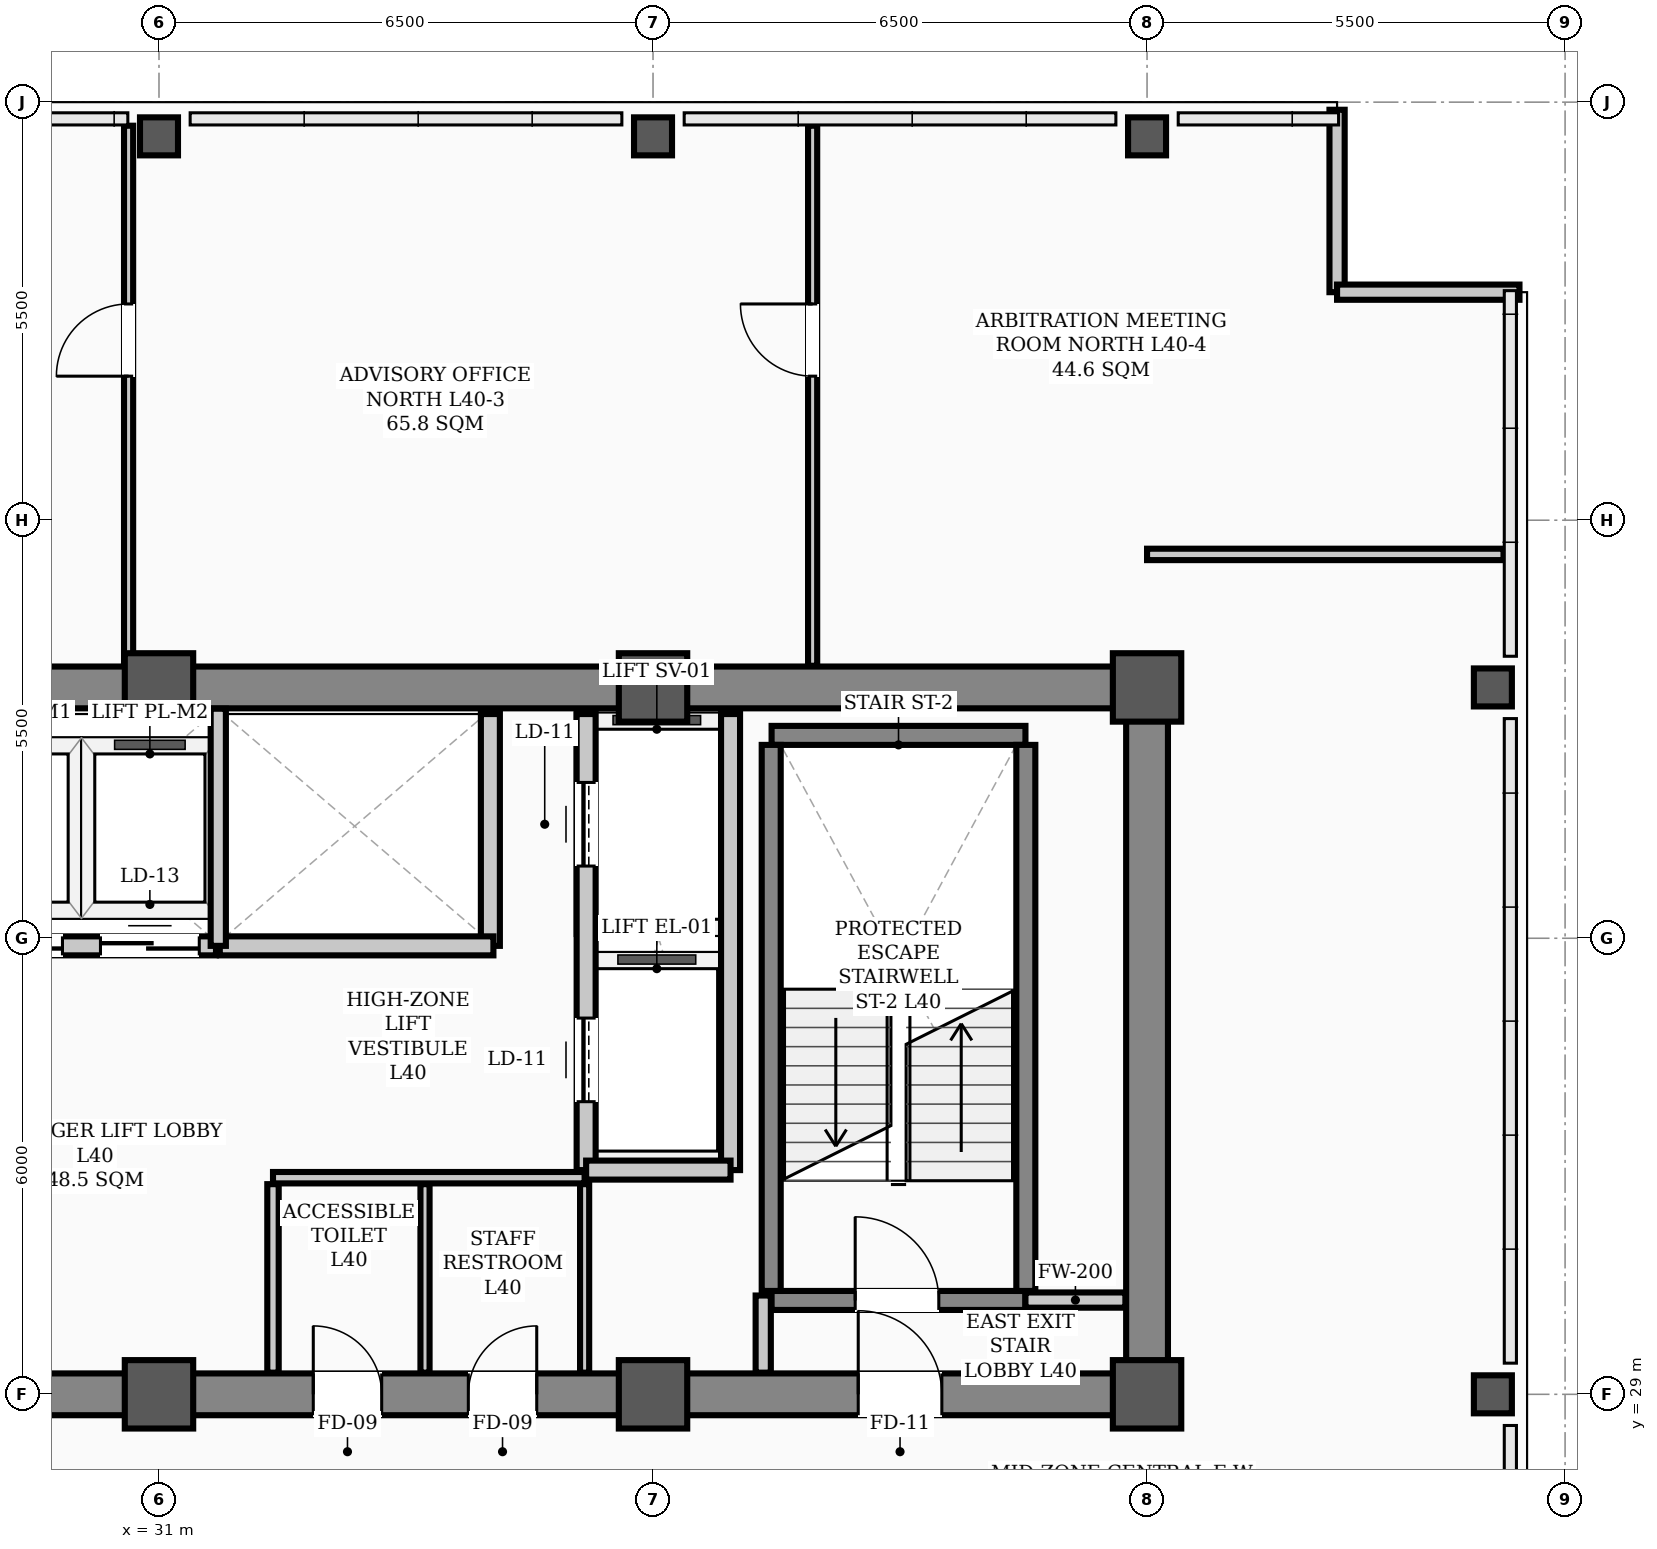
"""IFC4 building model, lengths in metres.
Left out: names, types, materials, properties, quantities, classifications, styles, units other than length and angle.
Written with IfcOpenShell. Run it as: python <this file> out.ifc"""

import sys

from ifc_helpers import new_model, si_unit, direction, frame, frame_2d, origin, origin_2d, place, context, subcontext, project, spatial, rectangle, hollow_rectangle, extrude, element, fill, save


model = new_model("IFC4")
c1 = context("Model", 3, precision=1e-05, world=origin(), true_north=direction((0.0, 1.0)))
c2 = subcontext(c1, "Body", "Model", "MODEL_VIEW")
j1 = project(units=[si_unit("LENGTHUNIT", "METRE"), si_unit("PLANEANGLEUNIT", "RADIAN")], contexts=[c1])
p1 = place(None, origin())
s1 = spatial("IfcSite", under=j1, at=p1, CompositionType="ELEMENT")
p2 = place(p1, origin())
s2 = spatial("IfcBuilding", under=s1, at=p2, CompositionType="ELEMENT")
p3 = place(p2, frame((0.0, 0.0, 161.7)))
s3 = spatial("IfcBuildingStorey", under=s2, at=p3, CompositionType="ELEMENT", Elevation=161.7)
for number, where, z_axis, x_axis in (
    (1, (31.0, 29.0, 0.0), (0.0, 0.0, 1.0), (1.0, 0.0, 0.0)),
    (2, (31.0, 38.3, 0.0), (0.0, 0.0, 1.0), (1.0, 0.0, 0.0)),
    (3, (37.5, 29.0, 0.0), (0.0, 0.0, 1.0), (1.0, 0.0, 0.0)),
    (4, (37.5, 38.3, 0.0), (0.0, 0.0, 1.0), (1.0, 0.0, 0.0)),
    (5, (44.0, 29.0, 0.0), (0.0, 0.0, 1.0), (1.0, 0.0, 0.0)),
    (6, (44.0, 38.3, 0.0), (0.0, 0.0, 1.0), (1.0, 0.0, 0.0)),
):
    element("IfcColumn", number, at=place(p3, frame(where, z_axis=z_axis, x_axis=x_axis)), inside=s3, PredefinedType="COLUMN", context=c2, shape_type="SweptSolid", body=[
        extrude(hollow_rectangle(XDim=0.9, YDim=0.9, WallThickness=0.035, InnerFilletRadius=0.017, OuterFilletRadius=0.052, at=origin_2d()), origin(), (0.0, 0.0, 1.0), 3.9),
    ])
for number, where, z_axis, x_axis in (
    (7, (31.0, 45.55, 0.0), (0.0, 0.0, 1.0), (1.0, 0.0, 0.0)),
    (8, (37.5, 45.55, 0.0), (0.0, 0.0, 1.0), (1.0, 0.0, 0.0)),
    (9, (44.0, 45.55, 0.0), (0.0, 0.0, 1.0), (1.0, 0.0, 0.0)),
    (10, (48.55, 29.0, 0.0), (0.0, 0.0, 1.0), (1.0, 0.0, 0.0)),
    (11, (48.55, 38.3, 0.0), (0.0, 0.0, 1.0), (1.0, 0.0, 0.0)),
):
    element("IfcColumn", number, at=place(p3, frame(where, z_axis=z_axis, x_axis=x_axis)), inside=s3, PredefinedType="COLUMN", context=c2, shape_type="SweptSolid", body=[
        extrude(hollow_rectangle(XDim=0.5, YDim=0.5, WallThickness=0.024, InnerFilletRadius=0.012, OuterFilletRadius=0.036, at=origin_2d()), origin(), (0.0, 0.0, 1.0), 3.9),
    ])
for number, where, z_axis, x_axis in (
    (12, (46.5, 45.9, 0.0), (0.0, 0.0, 1.0), (0.0, -1.0, 0.0)),
    (13, (46.5, 43.5, 0.0), (0.0, 0.0, 1.0), (1.0, 0.0, 0.0)),
):
    element("IfcWall", number, at=place(p3, frame(where, z_axis=z_axis, x_axis=x_axis)), inside=s3, PredefinedType="PARAPET", context=c2, shape_type="SweptSolid", body=[
        extrude(rectangle(XDim=2.4, YDim=0.2, at=frame_2d((1.2, 0.0))), origin(), (0.0, 0.0, 1.0), 1.2),
    ])
p4 = place(p3, frame((13.5, 29.0, 0.0), z_axis=(0.0, 0.0, 1.0), x_axis=(1.0, 0.0, 0.0)))
e14 = element("IfcWall", 14, at=p4, inside=s3, PredefinedType="SHEAR", context=c2, shape_type="SweptSolid", body=[
    extrude(rectangle(XDim=30.5, YDim=0.55, at=frame_2d((15.25, 0.0))), origin(), (0.0, 0.0, 1.0), 3.72),
])
p5 = place(p4, frame((1.75, 0.0, 0.0)))
e15 = element("IfcOpeningElement", 15, at=p5, cuts=e14, PredefinedType="OPENING", context=c2, shape_type="SweptSolid", body=[
    extrude(rectangle(XDim=1.1, YDim=2.08, at=frame_2d((0.55, 1.04))), frame((0.0, 0.285, 0.0), z_axis=(0.0, -1.0, 0.0), x_axis=(1.0, 0.0, 0.0)), (0.0, 0.0, 1.0), 0.57),
])
p6 = place(p4, frame((26.7, 0.0, 0.0)))
e16 = element("IfcOpeningElement", 16, at=p6, cuts=e14, PredefinedType="OPENING", context=c2, shape_type="SweptSolid", body=[
    extrude(rectangle(XDim=1.1, YDim=2.08, at=frame_2d((0.55, 1.04))), frame((0.0, 0.285, 0.0), z_axis=(0.0, -1.0, 0.0), x_axis=(1.0, 0.0, 0.0)), (0.0, 0.0, 1.0), 0.57),
])
p7 = place(p4, frame((6.8, 0.0, 0.0)))
e17 = element("IfcOpeningElement", 17, at=p7, cuts=e14, PredefinedType="OPENING", context=c2, shape_type="SweptSolid", body=[
    extrude(rectangle(XDim=1.1, YDim=2.08, at=frame_2d((0.55, 1.04))), frame((0.0, 0.285, 0.0), z_axis=(0.0, -1.0, 0.0), x_axis=(1.0, 0.0, 0.0)), (0.0, 0.0, 1.0), 0.57),
])
p8 = place(p4, frame((13.2, 0.0, 0.0)))
e18 = element("IfcOpeningElement", 18, at=p8, cuts=e14, PredefinedType="OPENING", context=c2, shape_type="SweptSolid", body=[
    extrude(rectangle(XDim=1.6, YDim=2.08, at=frame_2d((0.8, 1.04))), frame((0.0, 0.285, 0.0), z_axis=(0.0, -1.0, 0.0), x_axis=(1.0, 0.0, 0.0)), (0.0, 0.0, 1.0), 0.57),
])
p9 = place(p4, frame((19.53, 0.0, 0.0)))
e19 = element("IfcOpeningElement", 19, at=p9, cuts=e14, PredefinedType="OPENING", context=c2, shape_type="SweptSolid", body=[
    extrude(rectangle(XDim=0.9, YDim=2.08, at=frame_2d((0.45, 1.04))), frame((0.0, 0.285, 0.0), z_axis=(0.0, -1.0, 0.0), x_axis=(1.0, 0.0, 0.0)), (0.0, 0.0, 1.0), 0.57),
])
p10 = place(p4, frame((21.57, 0.0, 0.0)))
e20 = element("IfcOpeningElement", 20, at=p10, cuts=e14, PredefinedType="OPENING", context=c2, shape_type="SweptSolid", body=[
    extrude(rectangle(XDim=0.9, YDim=2.08, at=frame_2d((0.45, 1.04))), frame((0.0, 0.285, 0.0), z_axis=(0.0, -1.0, 0.0), x_axis=(1.0, 0.0, 0.0)), (0.0, 0.0, 1.0), 0.57),
])
p11 = place(p3, frame((13.5, 38.3, 0.0), z_axis=(0.0, 0.0, 1.0), x_axis=(1.0, 0.0, 0.0)))
e21 = element("IfcWall", 21, at=p11, inside=s3, PredefinedType="SHEAR", context=c2, shape_type="SweptSolid", body=[
    extrude(rectangle(XDim=30.5, YDim=0.55, at=frame_2d((15.25, 0.0))), origin(), (0.0, 0.0, 1.0), 3.72),
])
p12 = place(p3, frame((44.0, 29.35, 0.0), z_axis=(0.0, 0.0, 1.0), x_axis=(0.0, 1.0, 0.0)))
e22 = element("IfcWall", 22, at=p12, inside=s3, PredefinedType="SHEAR", context=c2, shape_type="SweptSolid", body=[
    extrude(rectangle(XDim=8.6, YDim=0.55, at=frame_2d((4.3, 0.0))), origin(), (0.0, 0.0, 1.0), 3.72),
])
p13 = place(p3, frame((39.06, 30.235, 0.0), z_axis=(0.0, 0.0, 1.0), x_axis=(1.0, 0.0, 0.0)))
e23 = element("IfcWall", 23, at=p13, inside=s3, PredefinedType="STANDARD", context=c2, shape_type="SweptSolid", body=[
    extrude(rectangle(XDim=3.34, YDim=0.25, at=frame_2d((1.67, 0.0))), origin(), (0.0, 0.0, 1.0), 3.72),
])
p14 = place(p13, frame((1.1, 0.0, 0.0)))
e24 = element("IfcOpeningElement", 24, at=p14, cuts=e23, PredefinedType="OPENING", context=c2, shape_type="SweptSolid", body=[
    extrude(rectangle(XDim=1.1, YDim=2.08, at=frame_2d((0.55, 1.04))), frame((0.0, 0.135, 0.0), z_axis=(0.0, -1.0, 0.0), x_axis=(1.0, 0.0, 0.0)), (0.0, 0.0, 1.0), 0.27),
])
p15 = place(p3, frame((39.06, 37.669, 0.0), z_axis=(0.0, 0.0, 1.0), x_axis=(1.0, 0.0, 0.0)))
e25 = element("IfcWall", 25, at=p15, inside=s3, PredefinedType="STANDARD", context=c2, shape_type="SweptSolid", body=[
    extrude(rectangle(XDim=3.34, YDim=0.25, at=frame_2d((1.67, 0.0))), origin(), (0.0, 0.0, 1.0), 3.72),
])
for number, where, z_axis, x_axis in (
    (26, (39.055, 30.36, 0.0), (0.0, 0.0, 1.0), (0.0, 1.0, 0.0)),
    (27, (42.405, 30.36, 0.0), (0.0, 0.0, 1.0), (0.0, 1.0, 0.0)),
):
    element("IfcWall", number, at=place(p3, frame(where, z_axis=z_axis, x_axis=x_axis)), inside=s3, PredefinedType="STANDARD", context=c2, shape_type="SweptSolid", body=[
        extrude(rectangle(XDim=7.184, YDim=0.25, at=frame_2d((3.592, 0.0))), origin(), (0.0, 0.0, 1.0), 3.72),
    ])
p16 = place(p3, frame((36.62, 31.95, 0.0), z_axis=(0.0, 0.0, 1.0), x_axis=(0.0, 1.0, 0.0)))
e28 = element("IfcWall", 28, at=p16, inside=s3, PredefinedType="STANDARD", context=c2, shape_type="SweptSolid", body=[
    extrude(rectangle(XDim=6.0, YDim=0.25, at=frame_2d((3.0, 0.0))), origin(), (0.0, 0.0, 1.0), 3.35),
])
p17 = place(p16, frame((0.9, 0.0, 0.0)))
e29 = element("IfcOpeningElement", 29, at=p17, cuts=e28, PredefinedType="OPENING", context=c2, shape_type="SweptSolid", body=[
    extrude(rectangle(XDim=1.1, YDim=2.08, at=frame_2d((0.55, 1.04))), frame((0.0, 0.135, 0.0), z_axis=(0.0, -1.0, 0.0), x_axis=(1.0, 0.0, 0.0)), (0.0, 0.0, 1.0), 0.27),
])
p18 = place(p16, frame((4.0, 0.0, 0.0)))
e30 = element("IfcOpeningElement", 30, at=p18, cuts=e28, PredefinedType="OPENING", context=c2, shape_type="SweptSolid", body=[
    extrude(rectangle(XDim=1.1, YDim=2.08, at=frame_2d((0.55, 1.04))), frame((0.0, 0.135, 0.0), z_axis=(0.0, -1.0, 0.0), x_axis=(1.0, 0.0, 0.0)), (0.0, 0.0, 1.0), 0.27),
])
p19 = place(p3, frame((38.52, 31.95, 0.0), z_axis=(0.0, 0.0, 1.0), x_axis=(0.0, 1.0, 0.0)))
e31 = element("IfcWall", 31, at=p19, inside=s3, PredefinedType="STANDARD", context=c2, shape_type="SweptSolid", body=[
    extrude(rectangle(XDim=6.0, YDim=0.25, at=frame_2d((3.0, 0.0))), origin(), (0.0, 0.0, 1.0), 3.35),
])
p20 = place(p3, frame((36.62, 31.95, 0.0), z_axis=(0.0, 0.0, 1.0), x_axis=(1.0, 0.0, 0.0)))
e32 = element("IfcWall", 32, at=p20, inside=s3, PredefinedType="STANDARD", context=c2, shape_type="SweptSolid", body=[
    extrude(rectangle(XDim=1.9, YDim=0.25, at=frame_2d((0.95, 0.0))), origin(), (0.0, 0.0, 1.0), 3.48),
])
p21 = place(p3, frame((35.36, 34.9, 0.0), z_axis=(0.0, 0.0, 1.0), x_axis=(0.0, 1.0, 0.0)))
e33 = element("IfcWall", 33, at=p21, inside=s3, PredefinedType="STANDARD", context=c2, shape_type="SweptSolid", body=[
    extrude(rectangle(XDim=3.05, YDim=0.25, at=frame_2d((1.525, 0.0))), origin(), (0.0, 0.0, 1.0), 3.35),
])
p22 = place(p3, frame((28.2, 34.9, 0.0), z_axis=(0.0, 0.0, 1.0), x_axis=(1.0, 0.0, 0.0)))
e34 = element("IfcWall", 34, at=p22, inside=s3, PredefinedType="STANDARD", context=c2, shape_type="SweptSolid", body=[
    extrude(rectangle(XDim=3.55, YDim=0.25, at=frame_2d((1.775, 0.0))), origin(), (0.0, 0.0, 1.0), 3.72),
])
p23 = place(p22, frame((0.23, 0.0, 0.0)))
e35 = element("IfcOpeningElement", 35, at=p23, cuts=e34, PredefinedType="OPENING", context=c2, shape_type="SweptSolid", body=[
    extrude(rectangle(XDim=1.3, YDim=2.08, at=frame_2d((0.65, 1.04))), frame((0.0, 0.135, 0.0), z_axis=(0.0, -1.0, 0.0), x_axis=(1.0, 0.0, 0.0)), (0.0, 0.0, 1.0), 0.27),
])
p24 = place(p22, frame((2.03, 0.0, 0.0)))
e36 = element("IfcOpeningElement", 36, at=p24, cuts=e34, PredefinedType="OPENING", context=c2, shape_type="SweptSolid", body=[
    extrude(rectangle(XDim=1.3, YDim=2.08, at=frame_2d((0.65, 1.04))), frame((0.0, 0.135, 0.0), z_axis=(0.0, -1.0, 0.0), x_axis=(1.0, 0.0, 0.0)), (0.0, 0.0, 1.0), 0.27),
])
p25 = place(p3, frame((31.8, 34.9, 0.0), z_axis=(0.0, 0.0, 1.0), x_axis=(1.0, 0.0, 0.0)))
e37 = element("IfcWall", 37, at=p25, inside=s3, PredefinedType="STANDARD", context=c2, shape_type="SweptSolid", body=[
    extrude(rectangle(XDim=3.6, YDim=0.25, at=frame_2d((1.8, 0.0))), origin(), (0.0, 0.0, 1.0), 3.72),
])
p26 = place(p3, frame((42.4, 30.24, 0.0), z_axis=(0.0, 0.0, 1.0), x_axis=(1.0, 0.0, 0.0)))
e38 = element("IfcWall", 38, at=p26, inside=s3, PredefinedType="STANDARD", context=c2, shape_type="SweptSolid", body=[
    extrude(rectangle(XDim=1.315, YDim=0.2, at=frame_2d((0.658, 0.0))), origin(), (0.0, 0.0, 1.0), 3.2),
])
p27 = place(p3, frame((32.5, 31.85, 0.0), z_axis=(0.0, 0.0, 1.0), x_axis=(1.0, 0.0, 0.0)))
e39 = element("IfcWall", 39, at=p27, inside=s3, PredefinedType="PARTITIONING", context=c2, shape_type="SweptSolid", body=[
    extrude(rectangle(XDim=4.1, YDim=0.15, at=frame_2d((2.05, 0.0))), origin(), (0.0, 0.0, 1.0), 3.72),
])
p28 = place(p3, frame((44.0, 40.05, 0.0), z_axis=(0.0, 0.0, 1.0), x_axis=(1.0, 0.0, 0.0)))
e40 = element("IfcWall", 40, at=p28, inside=s3, PredefinedType="PARTITIONING", context=c2, shape_type="SweptSolid", body=[
    extrude(rectangle(XDim=4.69, YDim=0.15, at=frame_2d((2.345, 0.0))), origin(), (0.0, 0.0, 1.0), 3.2),
])
p29 = place(p3, frame((38.95, 29.285, 0.0), z_axis=(0.0, 0.0, 1.0), x_axis=(0.0, 1.0, 0.0)))
e41 = element("IfcWall", 41, at=p29, inside=s3, PredefinedType="STANDARD", context=c2, shape_type="SweptSolid", body=[
    extrude(rectangle(XDim=1.015, YDim=0.2, at=frame_2d((0.508, 0.0))), origin(), (0.0, 0.0, 1.0), 3.35),
])
p30 = place(p3, frame((32.5, 29.285, 0.0), z_axis=(0.0, 0.0, 1.0), x_axis=(0.0, 1.0, 0.0)))
e42 = element("IfcWall", 42, at=p30, inside=s3, PredefinedType="PARTITIONING", context=c2, shape_type="SweptSolid", body=[
    extrude(rectangle(XDim=2.48, YDim=0.15, at=frame_2d((1.24, 0.0))), origin(), (0.0, 0.0, 1.0), 3.35),
])
for number, where, z_axis, x_axis in (
    (43, (36.6, 29.285, 0.0), (0.0, 0.0, 1.0), (0.0, 1.0, 0.0)),
    (44, (34.5, 29.285, 0.0), (0.0, 0.0, 1.0), (0.0, 1.0, 0.0)),
):
    element("IfcWall", number, at=place(p3, frame(where, z_axis=z_axis, x_axis=x_axis)), inside=s3, PredefinedType="PARTITIONING", context=c2, shape_type="SweptSolid", body=[
        extrude(rectangle(XDim=2.48, YDim=0.12, at=frame_2d((1.24, 0.0))), origin(), (0.0, 0.0, 1.0), 3.35),
    ])
p31 = place(p3, frame((30.6, 38.585, 0.0), z_axis=(0.0, 0.0, 1.0), x_axis=(0.0, 1.0, 0.0)))
e45 = element("IfcWall", 45, at=p31, inside=s3, PredefinedType="PARTITIONING", context=c2, shape_type="SweptSolid", body=[
    extrude(rectangle(XDim=7.105, YDim=0.12, at=frame_2d((3.552, 0.0))), origin(), (0.0, 0.0, 1.0), 3.2),
])
p32 = place(p31, frame((3.81, 0.0, 0.0)))
e46 = element("IfcOpeningElement", 46, at=p32, cuts=e45, PredefinedType="OPENING", context=c2, shape_type="SweptSolid", body=[
    extrude(rectangle(XDim=0.95, YDim=2.08, at=frame_2d((0.475, 1.04))), frame((0.0, 0.07, 0.0), z_axis=(0.0, -1.0, 0.0), x_axis=(1.0, 0.0, 0.0)), (0.0, 0.0, 1.0), 0.14),
])
p33 = place(p3, frame((39.6, 38.585, 0.0), z_axis=(0.0, 0.0, 1.0), x_axis=(0.0, 1.0, 0.0)))
e47 = element("IfcWall", 47, at=p33, inside=s3, PredefinedType="PARTITIONING", context=c2, shape_type="SweptSolid", body=[
    extrude(rectangle(XDim=7.105, YDim=0.12, at=frame_2d((3.552, 0.0))), origin(), (0.0, 0.0, 1.0), 3.212),
])
p34 = place(p33, frame((3.81, 0.0, 0.0)))
e48 = element("IfcOpeningElement", 48, at=p34, cuts=e47, PredefinedType="OPENING", context=c2, shape_type="SweptSolid", body=[
    extrude(rectangle(XDim=0.95, YDim=2.08, at=frame_2d((0.475, 1.04))), frame((0.0, 0.07, 0.0), z_axis=(0.0, -1.0, 0.0), x_axis=(1.0, 0.0, 0.0)), (0.0, 0.0, 1.0), 0.14),
])
p35 = place(p3, frame((31.78, 34.9, 0.0), z_axis=(0.0, 0.0, 1.0), x_axis=(0.0, 1.0, 0.0)))
e49 = element("IfcWall", 49, at=p35, inside=s3, PredefinedType="STANDARD", context=c2, shape_type="SweptSolid", body=[
    extrude(rectangle(XDim=3.12, YDim=0.2, at=frame_2d((1.56, 0.0))), origin(), (0.0, 0.0, 1.0), 3.35),
])
p36 = place(p14, origin())
e50 = element("IfcDoor", 50, at=p36, inside=s3, OperationType="SINGLE_SWING_LEFT", PredefinedType="DOOR", context=c2, shape_type="SweptSolid", body=[
    extrude(rectangle(XDim=1.1, YDim=2.08, at=frame_2d((0.55, 1.04))), frame((0.0, 0.025, 0.0), z_axis=(0.0, -1.0, 0.0), x_axis=(1.0, 0.0, 0.0)), (0.0, 0.0, 1.0), 0.05),
])
fill(e24, e50)
p37 = place(p6, origin())
e51 = element("IfcDoor", 51, at=p37, inside=s3, OperationType="SINGLE_SWING_LEFT", PredefinedType="DOOR", context=c2, shape_type="SweptSolid", body=[
    extrude(rectangle(XDim=1.1, YDim=2.08, at=frame_2d((0.55, 1.04))), frame((0.0, 0.025, 0.0), z_axis=(0.0, -1.0, 0.0), x_axis=(1.0, 0.0, 0.0)), (0.0, 0.0, 1.0), 0.05),
])
fill(e16, e51)
p38 = place(p9, origin())
e52 = element("IfcDoor", 52, at=p38, inside=s3, OperationType="SINGLE_SWING_LEFT", PredefinedType="DOOR", context=c2, shape_type="SweptSolid", body=[
    extrude(rectangle(XDim=0.9, YDim=2.08, at=frame_2d((0.45, 1.04))), frame((0.0, 0.025, 0.0), z_axis=(0.0, -1.0, 0.0), x_axis=(1.0, 0.0, 0.0)), (0.0, 0.0, 1.0), 0.05),
])
fill(e19, e52)
p39 = place(p10, origin())
e53 = element("IfcDoor", 53, at=p39, inside=s3, OperationType="SINGLE_SWING_RIGHT", PredefinedType="DOOR", context=c2, shape_type="SweptSolid", body=[
    extrude(rectangle(XDim=0.9, YDim=2.08, at=frame_2d((0.45, 1.04))), frame((0.0, 0.025, 0.0), z_axis=(0.0, -1.0, 0.0), x_axis=(1.0, 0.0, 0.0)), (0.0, 0.0, 1.0), 0.05),
])
fill(e20, e53)
p40 = place(p32, origin())
e54 = element("IfcDoor", 54, at=p40, inside=s3, OperationType="SINGLE_SWING_LEFT", PredefinedType="DOOR", context=c2, shape_type="SweptSolid", body=[
    extrude(rectangle(XDim=0.95, YDim=2.08, at=frame_2d((0.475, 1.04))), frame((0.0, 0.025, 0.0), z_axis=(0.0, -1.0, 0.0), x_axis=(1.0, 0.0, 0.0)), (0.0, 0.0, 1.0), 0.05),
])
fill(e46, e54)
p41 = place(p34, origin())
e55 = element("IfcDoor", 55, at=p41, inside=s3, OperationType="SINGLE_SWING_RIGHT", PredefinedType="DOOR", context=c2, shape_type="SweptSolid", body=[
    extrude(rectangle(XDim=0.95, YDim=2.08, at=frame_2d((0.475, 1.04))), frame((0.0, 0.025, 0.0), z_axis=(0.0, -1.0, 0.0), x_axis=(1.0, 0.0, 0.0)), (0.0, 0.0, 1.0), 0.05),
])
fill(e48, e55)
p42 = place(p17, origin())
e56 = element("IfcDoor", 56, at=p42, inside=s3, OperationType="SLIDING_TO_LEFT", PredefinedType="DOOR", context=c2, shape_type="SweptSolid", body=[
    extrude(rectangle(XDim=1.1, YDim=2.08, at=frame_2d((0.55, 1.04))), frame((0.0, 0.025, 0.0), z_axis=(0.0, -1.0, 0.0), x_axis=(1.0, 0.0, 0.0)), (0.0, 0.0, 1.0), 0.05),
])
fill(e29, e56)
p43 = place(p18, origin())
e57 = element("IfcDoor", 57, at=p43, inside=s3, OperationType="SLIDING_TO_LEFT", PredefinedType="DOOR", context=c2, shape_type="SweptSolid", body=[
    extrude(rectangle(XDim=1.1, YDim=2.08, at=frame_2d((0.55, 1.04))), frame((0.0, 0.025, 0.0), z_axis=(0.0, -1.0, 0.0), x_axis=(1.0, 0.0, 0.0)), (0.0, 0.0, 1.0), 0.05),
])
fill(e30, e57)
p44 = place(p23, origin())
e58 = element("IfcDoor", 58, at=p44, inside=s3, OperationType="DOUBLE_DOOR_SLIDING", PredefinedType="DOOR", context=c2, shape_type="SweptSolid", body=[
    extrude(rectangle(XDim=1.3, YDim=2.08, at=frame_2d((0.65, 1.04))), frame((0.0, 0.025, 0.0), z_axis=(0.0, -1.0, 0.0), x_axis=(1.0, 0.0, 0.0)), (0.0, 0.0, 1.0), 0.05),
])
fill(e35, e58)
p45 = place(p24, origin())
e59 = element("IfcDoor", 59, at=p45, inside=s3, OperationType="DOUBLE_DOOR_SLIDING", PredefinedType="DOOR", context=c2, shape_type="SweptSolid", body=[
    extrude(rectangle(XDim=1.3, YDim=2.08, at=frame_2d((0.65, 1.04))), frame((0.0, 0.025, 0.0), z_axis=(0.0, -1.0, 0.0), x_axis=(1.0, 0.0, 0.0)), (0.0, 0.0, 1.0), 0.05),
])
fill(e36, e59)
save(model, sys.argv[1])
